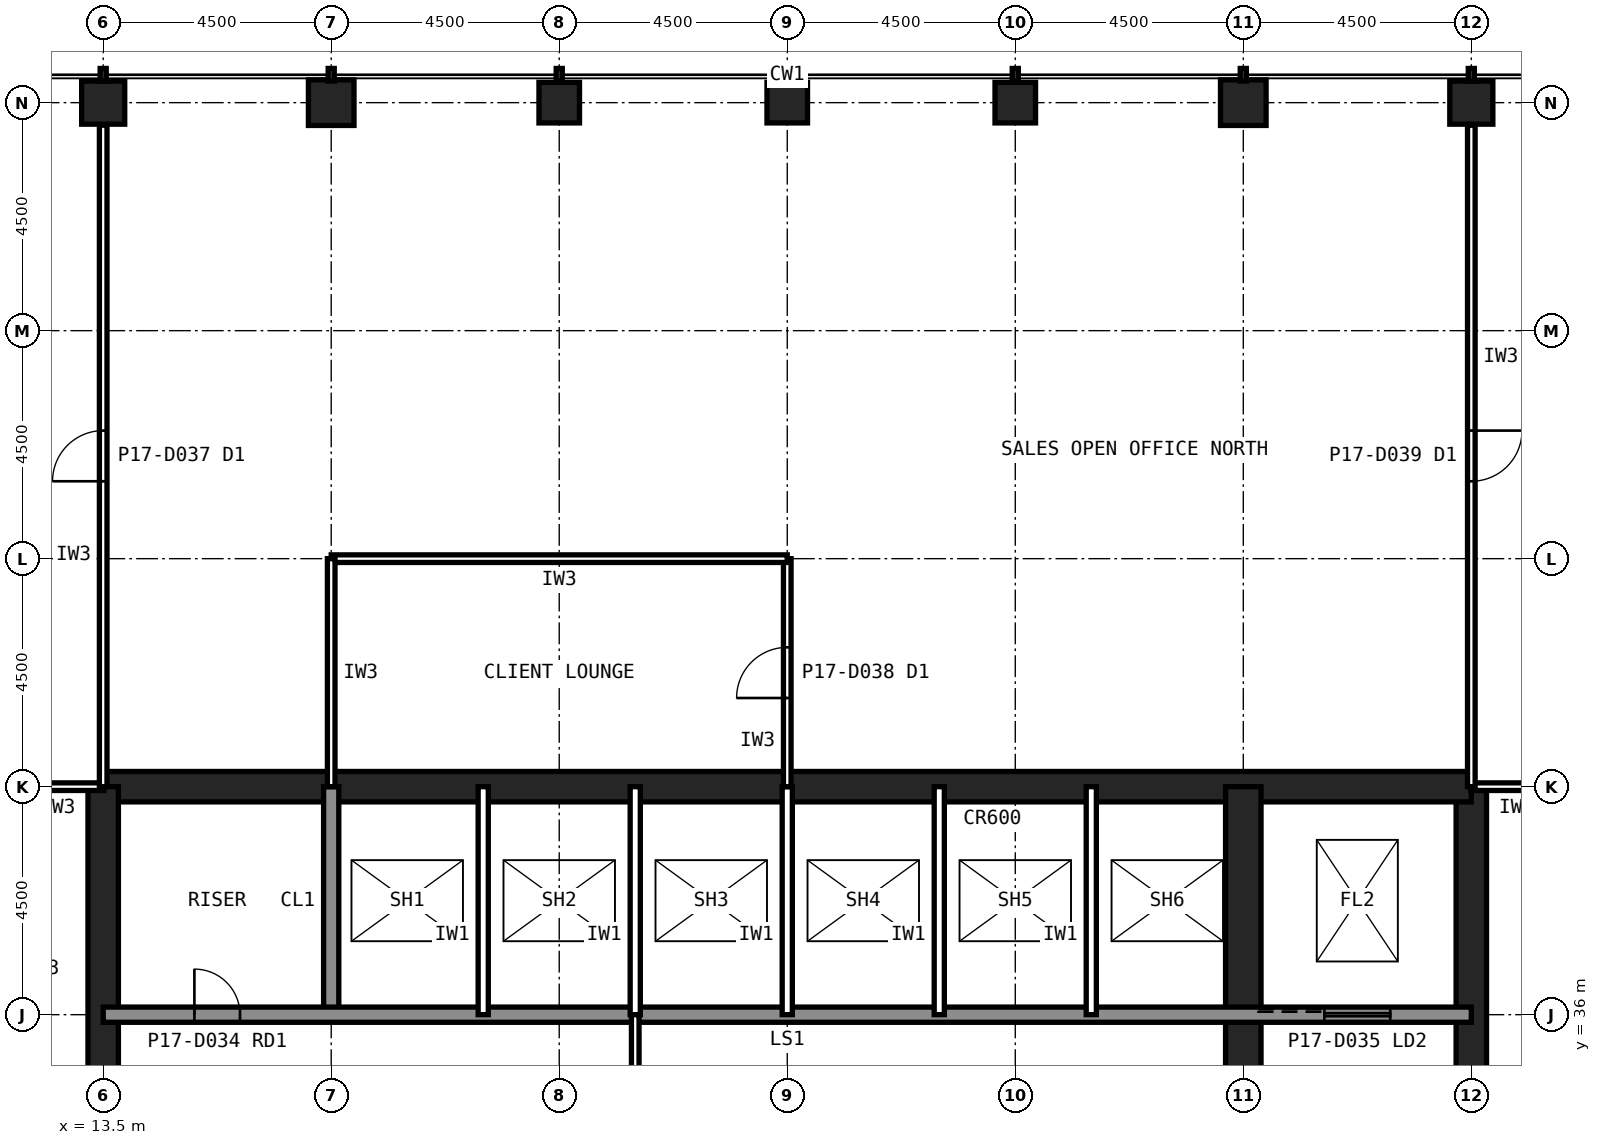
"""IFC4 building model, lengths in metres.
Left out: names, types, materials, properties, quantities, classifications, styles, units other than length and angle.
Written with IfcOpenShell. Run it as: python <this file> out.ifc"""

import sys

from ifc_helpers import new_model, si_unit, direction, frame, frame_2d, origin, origin_2d, place, context, subcontext, project, spatial, rectangle, hollow_rectangle, extrude, element, fill, save


model = new_model("IFC4")
c1 = context("Model", 3, precision=1e-05, world=origin(), true_north=direction((0.0, 1.0)))
c2 = subcontext(c1, "Body", "Model", "MODEL_VIEW")
j1 = project(units=[si_unit("LENGTHUNIT", "METRE"), si_unit("PLANEANGLEUNIT", "RADIAN")], contexts=[c1])
p1 = place(None, origin())
s1 = spatial("IfcSite", under=j1, at=p1, CompositionType="ELEMENT")
p2 = place(p1, origin())
s2 = spatial("IfcBuilding", under=s1, at=p2, CompositionType="ELEMENT")
p3 = place(p2, frame((0.0, 0.0, 71.0)))
s3 = spatial("IfcBuildingStorey", under=s2, at=p3, CompositionType="ELEMENT", Elevation=71.0)
p4 = place(p3, frame((40.5, 54.0, 0.0), z_axis=(0.0, 0.0, 1.0), x_axis=(1.0, 0.0, 0.0)))
e1 = element("IfcColumn", 1, at=p4, inside=s3, PredefinedType="COLUMN", context=c2, shape_type="SweptSolid", body=[
    extrude(hollow_rectangle(XDim=0.85, YDim=0.85, WallThickness=0.05, at=origin_2d()), origin(), (0.0, 0.0, 1.0), 4.2),
])
p5 = place(p3, frame((36.0, 54.0, 0.0), z_axis=(0.0, 0.0, 1.0), x_axis=(1.0, 0.0, 0.0)))
e2 = element("IfcColumn", 2, at=p5, inside=s3, PredefinedType="COLUMN", context=c2, shape_type="SweptSolid", body=[
    extrude(hollow_rectangle(XDim=0.9, YDim=0.9, WallThickness=0.063, at=origin_2d()), origin(), (0.0, 0.0, 1.0), 4.2),
])
for number, where, z_axis, x_axis in (
    (3, (31.5, 54.0, 0.0), (0.0, 0.0, 1.0), (1.0, 0.0, 0.0)),
    (4, (27.0, 54.0, 0.0), (0.0, 0.0, 1.0), (1.0, 0.0, 0.0)),
    (5, (22.5, 54.0, 0.0), (0.0, 0.0, 1.0), (1.0, 0.0, 0.0)),
):
    element("IfcColumn", number, at=place(p3, frame(where, z_axis=z_axis, x_axis=x_axis)), inside=s3, PredefinedType="COLUMN", context=c2, shape_type="SweptSolid", body=[
        extrude(hollow_rectangle(XDim=0.8, YDim=0.8, WallThickness=0.045, at=origin_2d()), origin(), (0.0, 0.0, 1.0), 4.2),
    ])
p6 = place(p3, frame((18.0, 54.0, 0.0), z_axis=(0.0, 0.0, 1.0), x_axis=(1.0, 0.0, 0.0)))
e6 = element("IfcColumn", 6, at=p6, inside=s3, PredefinedType="COLUMN", context=c2, shape_type="SweptSolid", body=[
    extrude(hollow_rectangle(XDim=0.9, YDim=0.9, WallThickness=0.063, at=origin_2d()), origin(), (0.0, 0.0, 1.0), 4.2),
])
p7 = place(p3, frame((13.5, 54.0, 0.0), z_axis=(0.0, 0.0, 1.0), x_axis=(1.0, 0.0, 0.0)))
e7 = element("IfcColumn", 7, at=p7, inside=s3, PredefinedType="COLUMN", context=c2, shape_type="SweptSolid", body=[
    extrude(hollow_rectangle(XDim=0.85, YDim=0.85, WallThickness=0.05, at=origin_2d()), origin(), (0.0, 0.0, 1.0), 4.2),
])
p8 = place(p3, frame((40.5, 13.5, 0.0), z_axis=(0.0, 0.0, 1.0), x_axis=(0.0, 1.0, 0.0)))
e8 = element("IfcWall", 8, at=p8, inside=s3, PredefinedType="SHEAR", context=c2, shape_type="SweptSolid", body=[
    extrude(rectangle(XDim=27.0, YDim=0.6, at=frame_2d((13.5, 0.0))), origin(), (0.0, 0.0, 1.0), 4.2),
])
p9 = place(p8, frame((5.85, 0.0, 0.0)))
e9 = element("IfcOpeningElement", 9, at=p9, cuts=e8, PredefinedType="OPENING", context=c2, shape_type="SweptSolid", body=[
    extrude(rectangle(XDim=1.8, YDim=2.1, at=frame_2d((0.9, 1.05))), frame((0.0, 0.31, 0.0), z_axis=(0.0, -1.0, 0.0), x_axis=(1.0, 0.0, 0.0)), (0.0, 0.0, 1.0), 0.62),
])
p10 = place(p8, frame((19.65, 0.0, 0.0)))
e10 = element("IfcOpeningElement", 10, at=p10, cuts=e8, PredefinedType="OPENING", context=c2, shape_type="SweptSolid", body=[
    extrude(rectangle(XDim=1.2, YDim=2.1, at=frame_2d((0.6, 1.05))), frame((0.0, 0.31, 0.0), z_axis=(0.0, -1.0, 0.0), x_axis=(1.0, 0.0, 0.0)), (0.0, 0.0, 1.0), 0.62),
])
p11 = place(p3, frame((40.5, 40.5, 0.0), z_axis=(0.0, 0.0, 1.0), x_axis=(-1.0, 0.0, 0.0)))
e11 = element("IfcWall", 11, at=p11, inside=s3, PredefinedType="SHEAR", context=c2, shape_type="SweptSolid", body=[
    extrude(rectangle(XDim=27.0, YDim=0.6, at=frame_2d((13.5, 0.0))), origin(), (0.0, 0.0, 1.0), 4.2),
])
p12 = place(p3, frame((13.5, 40.5, 0.0), z_axis=(0.0, 0.0, 1.0), x_axis=(0.0, -1.0, 0.0)))
e12 = element("IfcWall", 12, at=p12, inside=s3, PredefinedType="SHEAR", context=c2, shape_type="SweptSolid", body=[
    extrude(rectangle(XDim=27.0, YDim=0.6, at=frame_2d((13.5, 0.0))), origin(), (0.0, 0.0, 1.0), 4.2),
])
p13 = place(p12, frame((19.65, 0.0, 0.0)))
e13 = element("IfcOpeningElement", 13, at=p13, cuts=e12, PredefinedType="OPENING", context=c2, shape_type="SweptSolid", body=[
    extrude(rectangle(XDim=1.2, YDim=2.1, at=frame_2d((0.6, 1.05))), frame((0.0, 0.31, 0.0), z_axis=(0.0, -1.0, 0.0), x_axis=(1.0, 0.0, 0.0)), (0.0, 0.0, 1.0), 0.62),
])
p14 = place(p12, frame((5.85, 0.0, 0.0)))
e14 = element("IfcOpeningElement", 14, at=p14, cuts=e12, PredefinedType="OPENING", context=c2, shape_type="SweptSolid", body=[
    extrude(rectangle(XDim=1.8, YDim=2.1, at=frame_2d((0.9, 1.05))), frame((0.0, 0.31, 0.0), z_axis=(0.0, -1.0, 0.0), x_axis=(1.0, 0.0, 0.0)), (0.0, 0.0, 1.0), 0.62),
])
p15 = place(p3, frame((18.0, 36.0, 0.0), z_axis=(0.0, 0.0, 1.0), x_axis=(0.0, 1.0, 0.0)))
e15 = element("IfcWall", 15, at=p15, inside=s3, PredefinedType="SOLIDWALL", context=c2, shape_type="SweptSolid", body=[
    extrude(rectangle(XDim=4.5, YDim=0.3, at=frame_2d((2.25, 0.0))), origin(), (0.0, 0.0, 1.0), 4.04),
])
p16 = place(p3, frame((36.0, 22.5, 0.0), z_axis=(0.0, 0.0, 1.0), x_axis=(0.0, 1.0, 0.0)))
e16 = element("IfcWall", 16, at=p16, inside=s3, PredefinedType="SHEAR", context=c2, shape_type="SweptSolid", body=[
    extrude(rectangle(XDim=18.0, YDim=0.7, at=frame_2d((9.0, 0.0))), origin(), (0.0, 0.0, 1.0), 4.2),
])
p17 = place(p3, frame((13.5, 36.0, 0.0), z_axis=(0.0, 0.0, 1.0), x_axis=(1.0, 0.0, 0.0)))
e17 = element("IfcWall", 17, at=p17, inside=s3, PredefinedType="SOLIDWALL", context=c2, shape_type="SweptSolid", body=[
    extrude(rectangle(XDim=27.0, YDim=0.3, at=frame_2d((13.5, 0.0))), origin(), (0.0, 0.0, 1.0), 4.04),
])
p18 = place(p17, frame((1.8, 0.0, 0.0)))
e18 = element("IfcOpeningElement", 18, at=p18, cuts=e17, PredefinedType="OPENING", context=c2, shape_type="SweptSolid", body=[
    extrude(rectangle(XDim=0.9, YDim=2.1, at=frame_2d((0.45, 1.05))), frame((0.0, 0.16, 0.0), z_axis=(0.0, -1.0, 0.0), x_axis=(1.0, 0.0, 0.0)), (0.0, 0.0, 1.0), 0.32),
])
p19 = place(p17, frame((24.1, 0.0, 0.0)))
e19 = element("IfcOpeningElement", 19, at=p19, cuts=e17, PredefinedType="OPENING", context=c2, shape_type="SweptSolid", body=[
    extrude(rectangle(XDim=1.3, YDim=2.2, at=frame_2d((0.65, 1.1))), frame((0.0, 0.16, 0.0), z_axis=(0.0, -1.0, 0.0), x_axis=(1.0, 0.0, 0.0)), (0.0, 0.0, 1.0), 0.32),
])
for number, where, z_axis, x_axis in (
    (20, (21.0, 36.0, 0.0), (0.0, 0.0, 1.0), (0.0, 1.0, 0.0)),
    (21, (24.0, 36.0, 0.0), (0.0, 0.0, 1.0), (0.0, 1.0, 0.0)),
    (22, (27.0, 36.0, 0.0), (0.0, 0.0, 1.0), (0.0, 1.0, 0.0)),
    (23, (30.0, 36.0, 0.0), (0.0, 0.0, 1.0), (0.0, 1.0, 0.0)),
    (24, (33.0, 36.0, 0.0), (0.0, 0.0, 1.0), (0.0, 1.0, 0.0)),
):
    element("IfcWall", number, at=place(p3, frame(where, z_axis=z_axis, x_axis=x_axis)), inside=s3, PredefinedType="PARTITIONING", context=c2, shape_type="SweptSolid", body=[
        extrude(rectangle(XDim=4.5, YDim=0.2, at=frame_2d((2.25, 0.0))), origin(), (0.0, 0.0, 1.0), 4.04),
    ])
for number, where, z_axis, x_axis in (
    (25, (18.0, 33.3, 0.0), (0.0, 0.0, 1.0), (0.0, 1.0, 0.0)),
    (26, (22.5, 33.3, 0.0), (0.0, 0.0, 1.0), (0.0, 1.0, 0.0)),
    (27, (30.0, 33.3, 0.0), (0.0, 0.0, 1.0), (0.0, 1.0, 0.0)),
):
    element("IfcWall", number, at=place(p3, frame(where, z_axis=z_axis, x_axis=x_axis)), inside=s3, PredefinedType="PARTITIONING", context=c2, shape_type="SweptSolid", body=[
        extrude(rectangle(XDim=2.7, YDim=0.15, at=frame_2d((1.35, 0.0))), origin(), (0.0, 0.0, 1.0), 4.04),
    ])
p20 = place(p3, frame((42.3, 42.3, 0.0), z_axis=(0.0, 0.0, 1.0), x_axis=(-1.0, 0.0, 0.0)))
e28 = element("IfcWall", 28, at=p20, inside=s3, PredefinedType="PARTITIONING", context=c2, shape_type="SweptSolid", body=[
    extrude(rectangle(XDim=13.5, YDim=0.15, at=frame_2d((6.75, 0.0))), origin(), (0.0, 0.0, 1.0), 4.04),
])
p21 = place(p20, frame((6.25, 0.0, 0.0)))
e29 = element("IfcOpeningElement", 29, at=p21, cuts=e28, PredefinedType="OPENING", context=c2, shape_type="SweptSolid", body=[
    extrude(rectangle(XDim=1.0, YDim=2.1, at=frame_2d((0.5, 1.05))), frame((0.0, 0.085, 0.0), z_axis=(0.0, -1.0, 0.0), x_axis=(1.0, 0.0, 0.0)), (0.0, 0.0, 1.0), 0.17),
])
p22 = place(p3, frame((28.8, 46.8, 0.0), z_axis=(0.0, 0.0, 1.0), x_axis=(-1.0, 0.0, 0.0)))
e30 = element("IfcWall", 30, at=p22, inside=s3, PredefinedType="PARTITIONING", context=c2, shape_type="SweptSolid", body=[
    extrude(rectangle(XDim=12.6, YDim=0.15, at=frame_2d((6.3, 0.0))), origin(), (0.0, 0.0, 1.0), 4.04),
])
for number, where, z_axis, x_axis in (
    (31, (16.2, 42.3, 0.0), (0.0, 0.0, 1.0), (-1.0, 0.0, 0.0)),
    (32, (16.2, 46.8, 0.0), (0.0, 0.0, 1.0), (0.0, -1.0, 0.0)),
    (33, (28.8, 42.3, 0.0), (0.0, 0.0, 1.0), (0.0, 1.0, 0.0)),
):
    element("IfcWall", number, at=place(p3, frame(where, z_axis=z_axis, x_axis=x_axis)), inside=s3, PredefinedType="PARTITIONING", context=c2, shape_type="SweptSolid", body=[
        extrude(rectangle(XDim=4.5, YDim=0.15, at=frame_2d((2.25, 0.0))), origin(), (0.0, 0.0, 1.0), 4.04),
    ])
p23 = place(p3, frame((27.0, 40.5, 0.0), z_axis=(0.0, 0.0, 1.0), x_axis=(0.0, 1.0, 0.0)))
e34 = element("IfcWall", 34, at=p23, inside=s3, PredefinedType="PARTITIONING", context=c2, shape_type="SweptSolid", body=[
    extrude(rectangle(XDim=4.5, YDim=0.15, at=frame_2d((2.25, 0.0))), origin(), (0.0, 0.0, 1.0), 3.189),
])
p24 = place(p23, frame((1.75, 0.0, 0.0)))
e35 = element("IfcOpeningElement", 35, at=p24, cuts=e34, PredefinedType="OPENING", context=c2, shape_type="SweptSolid", body=[
    extrude(rectangle(XDim=1.0, YDim=2.1, at=frame_2d((0.5, 1.05))), frame((0.0, 0.085, 0.0), z_axis=(0.0, -1.0, 0.0), x_axis=(1.0, 0.0, 0.0)), (0.0, 0.0, 1.0), 0.17),
])
p25 = place(p3, frame((27.0, 45.0, 0.0), z_axis=(0.0, 0.0, 1.0), x_axis=(-1.0, 0.0, 0.0)))
e36 = element("IfcWall", 36, at=p25, inside=s3, PredefinedType="PARTITIONING", context=c2, shape_type="SweptSolid", body=[
    extrude(rectangle(XDim=9.0, YDim=0.15, at=frame_2d((4.5, 0.0))), origin(), (0.0, 0.0, 1.0), 4.04),
])
p26 = place(p3, frame((18.0, 45.0, 0.0), z_axis=(0.0, 0.0, 1.0), x_axis=(0.0, -1.0, 0.0)))
e37 = element("IfcWall", 37, at=p26, inside=s3, PredefinedType="PARTITIONING", context=c2, shape_type="SweptSolid", body=[
    extrude(rectangle(XDim=4.5, YDim=0.15, at=frame_2d((2.25, 0.0))), origin(), (0.0, 0.0, 1.0), 3.189),
])
p27 = place(p3, frame((40.5, 53.555, 0.0), z_axis=(0.0, 0.0, 1.0), x_axis=(0.0, -1.0, 0.0)))
e38 = element("IfcWall", 38, at=p27, inside=s3, PredefinedType="PARTITIONING", context=c2, shape_type="SweptSolid", body=[
    extrude(rectangle(XDim=11.255, YDim=0.15, at=frame_2d((5.627, 0.0))), origin(), (0.0, 0.0, 1.0), 3.189),
])
p28 = place(p27, frame((5.127, 0.0, 0.0)))
e39 = element("IfcOpeningElement", 39, at=p28, cuts=e38, PredefinedType="OPENING", context=c2, shape_type="SweptSolid", body=[
    extrude(rectangle(XDim=1.0, YDim=2.1, at=frame_2d((0.5, 1.05))), frame((0.0, 0.085, 0.0), z_axis=(0.0, -1.0, 0.0), x_axis=(1.0, 0.0, 0.0)), (0.0, 0.0, 1.0), 0.17),
])
p29 = place(p3, frame((13.5, 42.3, 0.0), z_axis=(0.0, 0.0, 1.0), x_axis=(0.0, 1.0, 0.0)))
e40 = element("IfcWall", 40, at=p29, inside=s3, PredefinedType="PARTITIONING", context=c2, shape_type="SweptSolid", body=[
    extrude(rectangle(XDim=11.255, YDim=0.15, at=frame_2d((5.627, 0.0))), origin(), (0.0, 0.0, 1.0), 3.189),
])
p30 = place(p29, frame((5.127, 0.0, 0.0)))
e41 = element("IfcOpeningElement", 41, at=p30, cuts=e40, PredefinedType="OPENING", context=c2, shape_type="SweptSolid", body=[
    extrude(rectangle(XDim=1.0, YDim=2.1, at=frame_2d((0.5, 1.05))), frame((0.0, 0.085, 0.0), z_axis=(0.0, -1.0, 0.0), x_axis=(1.0, 0.0, 0.0)), (0.0, 0.0, 1.0), 0.17),
])
p31 = place(p18, origin())
e42 = element("IfcDoor", 42, at=p31, inside=s3, OperationType="SINGLE_SWING_LEFT", PredefinedType="DOOR", context=c2, shape_type="SweptSolid", body=[
    extrude(rectangle(XDim=0.9, YDim=2.1, at=frame_2d((0.45, 1.05))), frame((0.0, 0.025, 0.0), z_axis=(0.0, -1.0, 0.0), x_axis=(1.0, 0.0, 0.0)), (0.0, 0.0, 1.0), 0.05),
])
fill(e18, e42)
p32 = place(p19, origin())
e43 = element("IfcDoor", 43, at=p32, inside=s3, OperationType="SLIDING_TO_LEFT", PredefinedType="DOOR", context=c2, shape_type="SweptSolid", body=[
    extrude(rectangle(XDim=1.3, YDim=2.2, at=frame_2d((0.65, 1.1))), frame((0.0, 0.025, 0.0), z_axis=(0.0, -1.0, 0.0), x_axis=(1.0, 0.0, 0.0)), (0.0, 0.0, 1.0), 0.05),
])
fill(e19, e43)
p33 = place(p21, origin())
e44 = element("IfcDoor", 44, at=p33, inside=s3, OperationType="SINGLE_SWING_LEFT", PredefinedType="DOOR", context=c2, shape_type="SweptSolid", body=[
    extrude(rectangle(XDim=1.0, YDim=2.1, at=frame_2d((0.5, 1.05))), frame((0.0, 0.025, 0.0), z_axis=(0.0, -1.0, 0.0), x_axis=(1.0, 0.0, 0.0)), (0.0, 0.0, 1.0), 0.05),
])
fill(e29, e44)
p34 = place(p24, origin())
e45 = element("IfcDoor", 45, at=p34, inside=s3, OperationType="SINGLE_SWING_LEFT", PredefinedType="DOOR", context=c2, shape_type="SweptSolid", body=[
    extrude(rectangle(XDim=1.0, YDim=2.1, at=frame_2d((0.5, 1.05))), frame((0.0, 0.025, 0.0), z_axis=(0.0, -1.0, 0.0), x_axis=(1.0, 0.0, 0.0)), (0.0, 0.0, 1.0), 0.05),
])
fill(e35, e45)
p35 = place(p28, origin())
e46 = element("IfcDoor", 46, at=p35, inside=s3, OperationType="SINGLE_SWING_LEFT", PredefinedType="DOOR", context=c2, shape_type="SweptSolid", body=[
    extrude(rectangle(XDim=1.0, YDim=2.1, at=frame_2d((0.5, 1.05))), frame((0.0, 0.025, 0.0), z_axis=(0.0, -1.0, 0.0), x_axis=(1.0, 0.0, 0.0)), (0.0, 0.0, 1.0), 0.05),
])
fill(e39, e46)
p36 = place(p30, origin())
e47 = element("IfcDoor", 47, at=p36, inside=s3, OperationType="SINGLE_SWING_LEFT", PredefinedType="DOOR", context=c2, shape_type="SweptSolid", body=[
    extrude(rectangle(XDim=1.0, YDim=2.1, at=frame_2d((0.5, 1.05))), frame((0.0, 0.025, 0.0), z_axis=(0.0, -1.0, 0.0), x_axis=(1.0, 0.0, 0.0)), (0.0, 0.0, 1.0), 0.05),
])
fill(e41, e47)
save(model, sys.argv[1])
